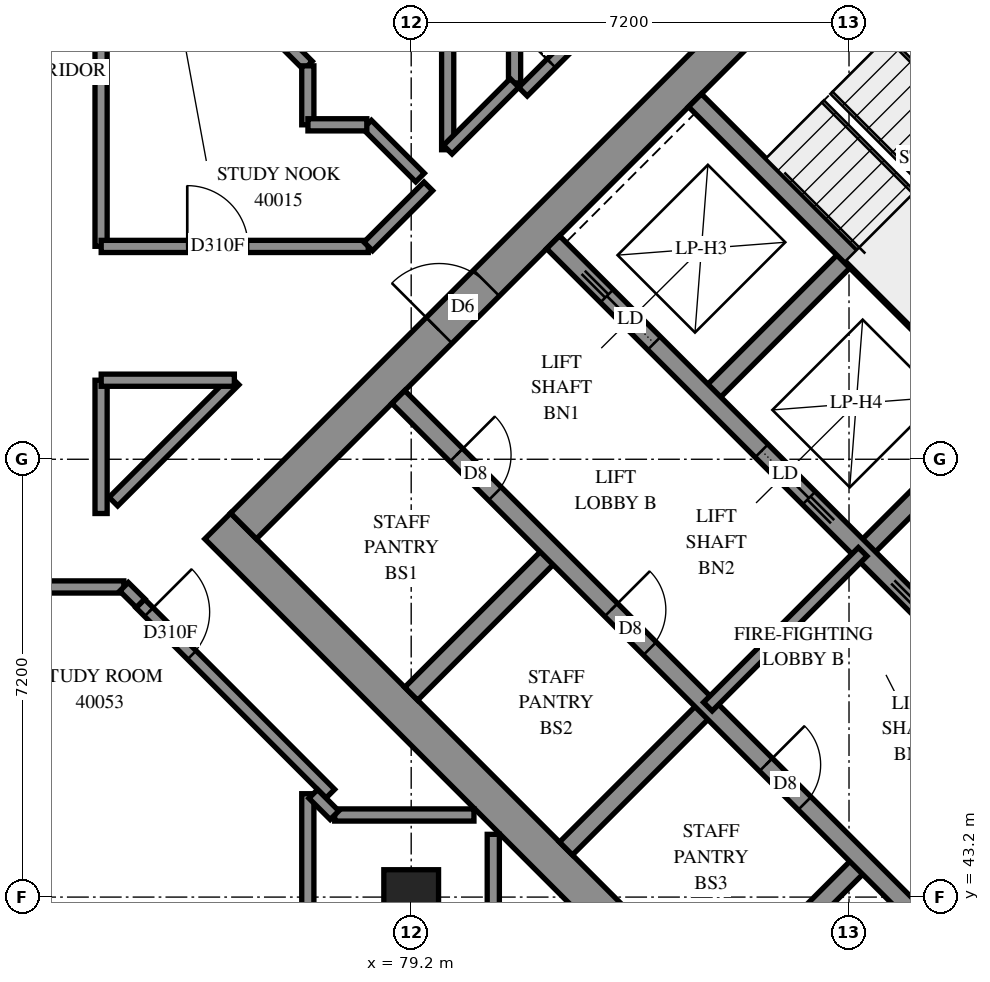
"""IFC4 building model, lengths in metres.
Left out: names, types, materials, properties, quantities, classifications, styles, units other than length and angle.
Written with IfcOpenShell. Run it as: python <this file> out.ifc"""

import sys

from ifc_helpers import new_model, si_unit, direction, frame, frame_2d, origin, origin_2d, place, context, subcontext, project, spatial, rectangle, extrude, element, fill, save


model = new_model("IFC4")
c1 = context("Model", 3, precision=1e-05, world=origin(), true_north=direction((0.0, 1.0)))
c2 = subcontext(c1, "Body", "Model", "MODEL_VIEW")
j1 = project(units=[si_unit("LENGTHUNIT", "METRE"), si_unit("PLANEANGLEUNIT", "RADIAN")], contexts=[c1])
p1 = place(None, origin())
s1 = spatial("IfcSite", under=j1, at=p1, CompositionType="ELEMENT")
p2 = place(p1, origin())
s2 = spatial("IfcBuilding", under=s1, at=p2, CompositionType="ELEMENT")
p3 = place(p2, frame((0.0, 0.0, 149.0)))
s3 = spatial("IfcBuildingStorey", under=s2, at=p3, CompositionType="ELEMENT", Elevation=149.0)
p4 = place(p3, frame((79.2, 43.2, 0.0), z_axis=(0.0, 0.0, 1.0), x_axis=(1.0, 0.0, 0.0)))
e1 = element("IfcColumn", 1, at=p4, inside=s3, PredefinedType="COLUMN", context=c2, shape_type="SweptSolid", body=[
    extrude(rectangle(XDim=0.9, YDim=0.9, at=origin_2d()), origin(), (0.0, 0.0, 1.0), 3.1),
])
p5 = place(p3, frame((76.018, 49.302, -0.3), z_axis=(0.0, 0.0, 1.0), x_axis=(0.7071067812, -0.7071067812, 0.0)))
e2 = element("IfcWall", 2, at=p5, inside=s3, PredefinedType="SHEAR", context=c2, shape_type="SweptSolid", body=[
    extrude(rectangle(XDim=15.6, YDim=0.6, at=frame_2d((7.8, 0.0))), origin(), (0.0, 0.0, 1.0), 2.7),
])
p6 = place(p3, frame((86.625, 59.908, -0.3), z_axis=(0.0, 0.0, 1.0), x_axis=(0.7071067812, -0.7071067812, 0.0)))
e3 = element("IfcWall", 3, at=p6, inside=s3, PredefinedType="SHEAR", context=c2, shape_type="SweptSolid", body=[
    extrude(rectangle(XDim=15.6, YDim=0.6, at=frame_2d((7.8, 0.0))), origin(), (0.0, 0.0, 1.0), 2.7),
])
p7 = place(p6, frame((10.6, 0.0, 0.3)))
e4 = element("IfcOpeningElement", 4, at=p7, cuts=e3, PredefinedType="OPENING", context=c2, shape_type="SweptSolid", body=[
    extrude(rectangle(XDim=0.8, YDim=2.1, at=frame_2d((0.4, 1.05))), frame((0.0, 0.31, 0.0), z_axis=(0.0, -1.0, 0.0), x_axis=(1.0, 0.0, 0.0)), (0.0, 0.0, 1.0), 0.62),
])
p8 = place(p3, frame((76.442, 49.302, -0.3), z_axis=(0.0, 0.0, 1.0), x_axis=(0.7071067812, 0.7071067812, 0.0)))
e5 = element("IfcWall", 5, at=p8, inside=s3, PredefinedType="SHEAR", context=c2, shape_type="SweptSolid", body=[
    extrude(rectangle(XDim=14.4, YDim=0.6, at=frame_2d((7.2, 0.0))), origin(), (0.0, 0.0, 1.0), 2.7),
])
p9 = place(p8, frame((4.55, 0.0, 0.3)))
e6 = element("IfcOpeningElement", 6, at=p9, cuts=e5, PredefinedType="OPENING", context=c2, shape_type="SweptSolid", body=[
    extrude(rectangle(XDim=1.1, YDim=2.1, at=frame_2d((0.55, 1.05))), frame((0.0, 0.31, 0.0), z_axis=(0.0, -1.0, 0.0), x_axis=(1.0, 0.0, 0.0)), (0.0, 0.0, 1.0), 0.62),
])
p10 = place(p8, frame((11.35, 0.0, 0.3)))
e7 = element("IfcOpeningElement", 7, at=p10, cuts=e5, PredefinedType="OPENING", context=c2, shape_type="SweptSolid", body=[
    extrude(rectangle(XDim=1.1, YDim=2.1, at=frame_2d((0.55, 1.05))), frame((0.0, 0.31, 0.0), z_axis=(0.0, -1.0, 0.0), x_axis=(1.0, 0.0, 0.0)), (0.0, 0.0, 1.0), 0.62),
])
p11 = place(p3, frame((87.049, 38.695, -0.3), z_axis=(0.0, 0.0, 1.0), x_axis=(0.7071067812, 0.7071067812, 0.0)))
e8 = element("IfcWall", 8, at=p11, inside=s3, PredefinedType="SHEAR", context=c2, shape_type="SweptSolid", body=[
    extrude(rectangle(XDim=14.4, YDim=0.6, at=frame_2d((7.2, 0.0))), origin(), (0.0, 0.0, 1.0), 2.7),
])
p12 = place(p11, frame((4.55, 0.0, 0.3)))
e9 = element("IfcOpeningElement", 9, at=p12, cuts=e8, PredefinedType="OPENING", context=c2, shape_type="SweptSolid", body=[
    extrude(rectangle(XDim=1.1, YDim=2.1, at=frame_2d((0.55, 1.05))), frame((0.0, 0.31, 0.0), z_axis=(0.0, -1.0, 0.0), x_axis=(1.0, 0.0, 0.0)), (0.0, 0.0, 1.0), 0.62),
])
p13 = place(p11, frame((11.35, 0.0, 0.3)))
e10 = element("IfcOpeningElement", 10, at=p13, cuts=e8, PredefinedType="OPENING", context=c2, shape_type="SweptSolid", body=[
    extrude(rectangle(XDim=1.1, YDim=2.1, at=frame_2d((0.55, 1.05))), frame((0.0, 0.31, 0.0), z_axis=(0.0, -1.0, 0.0), x_axis=(1.0, 0.0, 0.0)), (0.0, 0.0, 1.0), 0.62),
])
for number, where, z_axis, x_axis in (
    (11, (79.2, 46.544, 0.0), (0.0, 0.0, 1.0), (0.707, 0.707, 0.0)),
    (12, (84.079, 51.423, 0.0), (0.0, 0.0, 1.0), (0.707, 0.707, 0.0)),
):
    element("IfcWall", number, at=place(p3, frame(where, z_axis=z_axis, x_axis=x_axis)), inside=s3, PredefinedType="SOLIDWALL", context=c2, shape_type="SweptSolid", body=[
        extrude(rectangle(XDim=3.3, YDim=0.3, at=frame_2d((1.65, 0.0))), origin(), (0.0, 0.0, 1.0), 3.1),
    ])
p14 = place(p3, frame((81.746, 43.999, 0.0), z_axis=(0.0, 0.0, 1.0), x_axis=(0.7071067812, 0.7071067812, 0.0)))
e13 = element("IfcWall", 13, at=p14, inside=s3, PredefinedType="SOLIDWALL", context=c2, shape_type="SweptSolid", body=[
    extrude(rectangle(XDim=3.3, YDim=0.3, at=frame_2d((1.65, 0.0))), origin(), (0.0, 0.0, 1.0), 3.1),
])
p15 = place(p3, frame((86.625, 48.878, 0.0), z_axis=(0.0, 0.0, 1.0), x_axis=(0.7071067812, 0.7071067812, 0.0)))
e14 = element("IfcWall", 14, at=p15, inside=s3, PredefinedType="SOLIDWALL", context=c2, shape_type="SweptSolid", body=[
    extrude(rectangle(XDim=3.3, YDim=0.3, at=frame_2d((1.65, 0.0))), origin(), (0.0, 0.0, 1.0), 3.1),
])
p16 = place(p3, frame((84.291, 41.453, 0.0), z_axis=(0.0, 0.0, 1.0), x_axis=(0.7071067812, 0.7071067812, 0.0)))
e15 = element("IfcWall", 15, at=p16, inside=s3, PredefinedType="SOLIDWALL", context=c2, shape_type="SweptSolid", body=[
    extrude(rectangle(XDim=3.3, YDim=0.3, at=frame_2d((1.65, 0.0))), origin(), (0.0, 0.0, 1.0), 3.1),
])
p17 = place(p3, frame((78.988, 51.423, 0.0), z_axis=(0.0, 0.0, 1.0), x_axis=(0.7071067812, -0.7071067812, 0.0)))
e16 = element("IfcWall", 16, at=p17, inside=s3, PredefinedType="SOLIDWALL", context=c2, shape_type="SweptSolid", body=[
    extrude(rectangle(XDim=14.4, YDim=0.3, at=frame_2d((7.2, 0.0))), origin(), (0.0, 0.0, 1.0), 3.1),
])
p18 = place(p17, frame((1.35, 0.0, 0.0)))
e17 = element("IfcOpeningElement", 17, at=p18, cuts=e16, PredefinedType="OPENING", context=c2, shape_type="SweptSolid", body=[
    extrude(rectangle(XDim=0.9, YDim=2.1, at=frame_2d((0.45, 1.05))), frame((0.0, 0.16, 0.0), z_axis=(0.0, -1.0, 0.0), x_axis=(1.0, 0.0, 0.0)), (0.0, 0.0, 1.0), 0.32),
])
p19 = place(p17, frame((4.95, 0.0, 0.0)))
e18 = element("IfcOpeningElement", 18, at=p19, cuts=e16, PredefinedType="OPENING", context=c2, shape_type="SweptSolid", body=[
    extrude(rectangle(XDim=0.9, YDim=2.1, at=frame_2d((0.45, 1.05))), frame((0.0, 0.16, 0.0), z_axis=(0.0, -1.0, 0.0), x_axis=(1.0, 0.0, 0.0)), (0.0, 0.0, 1.0), 0.32),
])
p20 = place(p17, frame((8.55, 0.0, 0.0)))
e19 = element("IfcOpeningElement", 19, at=p20, cuts=e16, PredefinedType="OPENING", context=c2, shape_type="SweptSolid", body=[
    extrude(rectangle(XDim=0.9, YDim=2.1, at=frame_2d((0.45, 1.05))), frame((0.0, 0.16, 0.0), z_axis=(0.0, -1.0, 0.0), x_axis=(1.0, 0.0, 0.0)), (0.0, 0.0, 1.0), 0.32),
])
p21 = place(p17, frame((12.05, 0.0, 0.0)))
e20 = element("IfcOpeningElement", 20, at=p21, cuts=e16, PredefinedType="OPENING", context=c2, shape_type="SweptSolid", body=[
    extrude(rectangle(XDim=1.1, YDim=2.1, at=frame_2d((0.55, 1.05))), frame((0.0, 0.16, 0.0), z_axis=(0.0, -1.0, 0.0), x_axis=(1.0, 0.0, 0.0)), (0.0, 0.0, 1.0), 0.32),
])
p22 = place(p3, frame((81.534, 53.969, 0.0), z_axis=(0.0, 0.0, 1.0), x_axis=(0.707103309, -0.7071102534, 0.0)))
e21 = element("IfcWall", 21, at=p22, inside=s3, PredefinedType="SOLIDWALL", context=c2, shape_type="SweptSolid", body=[
    extrude(rectangle(XDim=14.4, YDim=0.3, at=frame_2d((7.2, 0.0))), origin(), (0.0, 0.0, 1.0), 3.1),
])
p23 = place(p22, frame((1.25, 0.0, 0.0)))
e22 = element("IfcOpeningElement", 22, at=p23, cuts=e21, PredefinedType="OPENING", context=c2, shape_type="SweptSolid", body=[
    extrude(rectangle(XDim=1.1, YDim=2.1, at=frame_2d((0.55, 1.05))), frame((0.0, 0.16, 0.0), z_axis=(0.0, -1.0, 0.0), x_axis=(1.0, 0.0, 0.0)), (0.0, 0.0, 1.0), 0.32),
])
p24 = place(p22, frame((4.85, 0.0, 0.0)))
e23 = element("IfcOpeningElement", 23, at=p24, cuts=e21, PredefinedType="OPENING", context=c2, shape_type="SweptSolid", body=[
    extrude(rectangle(XDim=1.1, YDim=2.1, at=frame_2d((0.55, 1.05))), frame((0.0, 0.16, 0.0), z_axis=(0.0, -1.0, 0.0), x_axis=(1.0, 0.0, 0.0)), (0.0, 0.0, 1.0), 0.32),
])
p25 = place(p22, frame((8.45, 0.0, 0.0)))
e24 = element("IfcOpeningElement", 24, at=p25, cuts=e21, PredefinedType="OPENING", context=c2, shape_type="SweptSolid", body=[
    extrude(rectangle(XDim=1.1, YDim=2.1, at=frame_2d((0.55, 1.05))), frame((0.0, 0.16, 0.0), z_axis=(0.0, -1.0, 0.0), x_axis=(1.0, 0.0, 0.0)), (0.0, 0.0, 1.0), 0.32),
])
p26 = place(p22, frame((12.05, 0.0, 0.0)))
e25 = element("IfcOpeningElement", 25, at=p26, cuts=e21, PredefinedType="OPENING", context=c2, shape_type="SweptSolid", body=[
    extrude(rectangle(XDim=1.1, YDim=2.1, at=frame_2d((0.55, 1.05))), frame((0.0, 0.16, 0.0), z_axis=(0.0, -1.0, 0.0), x_axis=(1.0, 0.0, 0.0)), (0.0, 0.0, 1.0), 0.32),
])
p27 = place(p3, frame((83.867, 56.302, 0.0), z_axis=(0.0, 0.0, 1.0), x_axis=(0.7071137256, -0.7070998367, 0.0)))
e26 = element("IfcWall", 26, at=p27, inside=s3, PredefinedType="SOLIDWALL", context=c2, shape_type="SweptSolid", body=[
    extrude(rectangle(XDim=7.2, YDim=0.3, at=frame_2d((3.6, 0.0))), origin(), (0.0, 0.0, 1.0), 3.1),
])
p28 = place(p3, frame((84.079, 46.332, 0.0), z_axis=(0.0, 0.0, 1.0), x_axis=(0.7071067812, 0.7071067812, 0.0)))
e27 = element("IfcWall", 27, at=p28, inside=s3, PredefinedType="PARTITIONING", context=c2, shape_type="SweptSolid", body=[
    extrude(rectangle(XDim=3.6, YDim=0.2, at=frame_2d((1.8, 0.0))), origin(), (0.0, 0.0, 1.0), 3.1),
])
p29 = place(p3, frame((55.5, 48.3, 0.0), z_axis=(0.0, 0.0, 1.0), x_axis=(1.0, 0.0, 0.0)))
e28 = element("IfcWall", 28, at=p29, inside=s3, PredefinedType="PARTITIONING", context=c2, shape_type="SweptSolid", body=[
    extrude(rectangle(XDim=18.974, YDim=0.2, at=frame_2d((9.487, 0.0))), origin(), (0.0, 0.0, 1.0), 3.1),
])
p30 = place(p29, frame((4.4, 0.0, 0.0)))
e29 = element("IfcOpeningElement", 29, at=p30, cuts=e28, PredefinedType="OPENING", context=c2, shape_type="SweptSolid", body=[
    extrude(rectangle(XDim=0.9, YDim=2.1, at=frame_2d((0.45, 1.05))), frame((0.0, 0.11, 0.0), z_axis=(0.0, -1.0, 0.0), x_axis=(1.0, 0.0, 0.0)), (0.0, 0.0, 1.0), 0.22),
])
p31 = place(p29, frame((6.1, 0.0, 0.0)))
e30 = element("IfcOpeningElement", 30, at=p31, cuts=e28, PredefinedType="OPENING", context=c2, shape_type="SweptSolid", body=[
    extrude(rectangle(XDim=0.9, YDim=2.1, at=frame_2d((0.45, 1.05))), frame((0.0, 0.11, 0.0), z_axis=(0.0, -1.0, 0.0), x_axis=(1.0, 0.0, 0.0)), (0.0, 0.0, 1.0), 0.22),
])
p32 = place(p29, frame((13.162, 0.0, 0.0)))
e31 = element("IfcOpeningElement", 31, at=p32, cuts=e28, PredefinedType="OPENING", context=c2, shape_type="SweptSolid", body=[
    extrude(rectangle(XDim=1.0, YDim=2.1, at=frame_2d((0.5, 1.05))), frame((0.0, 0.11, 0.0), z_axis=(0.0, -1.0, 0.0), x_axis=(1.0, 0.0, 0.0)), (0.0, 0.0, 1.0), 0.22),
])
p33 = place(p3, frame((81.038, 56.444, 0.0), z_axis=(0.0, 0.0, 1.0), x_axis=(0.7071067812, 0.7071067812, 0.0)))
e32 = element("IfcWall", 32, at=p33, inside=s3, PredefinedType="PARTITIONING", context=c2, shape_type="SweptSolid", body=[
    extrude(rectangle(XDim=8.2, YDim=0.2, at=frame_2d((4.1, 0.0))), origin(), (0.0, 0.0, 1.0), 3.1),
])
p34 = place(p33, frame((0.66, 0.0, 0.0)))
e33 = element("IfcOpeningElement", 33, at=p34, cuts=e32, PredefinedType="OPENING", context=c2, shape_type="SweptSolid", body=[
    extrude(rectangle(XDim=1.0, YDim=2.1, at=frame_2d((0.5, 1.05))), frame((0.0, 0.11, 0.0), z_axis=(0.0, -1.0, 0.0), x_axis=(1.0, 0.0, 0.0)), (0.0, 0.0, 1.0), 0.22),
])
p35 = place(p3, frame((74.1, 53.902, 0.0), z_axis=(0.0, 0.0, 1.0), x_axis=(0.0, 1.0, 0.0)))
e34 = element("IfcWall", 34, at=p35, inside=s3, PredefinedType="PARTITIONING", context=c2, shape_type="SweptSolid", body=[
    extrude(rectangle(XDim=6.366, YDim=0.2, at=frame_2d((3.183, 0.0))), origin(), (0.0, 0.0, 1.0), 3.1),
])
p36 = place(p3, frame((74.745, 48.029, 0.0), z_axis=(0.0, 0.0, 1.0), x_axis=(0.7068806156, -0.7073328745, 0.0)))
e35 = element("IfcWall", 35, at=p36, inside=s3, PredefinedType="PARTITIONING", context=c2, shape_type="SweptSolid", body=[
    extrude(rectangle(XDim=4.422, YDim=0.2, at=frame_2d((2.211, 0.0))), origin(), (0.0, 0.0, 1.0), 3.1),
])
p37 = place(p36, frame((0.199, 0.0, 0.0)))
e36 = element("IfcOpeningElement", 36, at=p37, cuts=e35, PredefinedType="OPENING", context=c2, shape_type="SweptSolid", body=[
    extrude(rectangle(XDim=1.0, YDim=2.1, at=frame_2d((0.5, 1.05))), frame((0.0, 0.11, 0.0), z_axis=(0.0, -1.0, 0.0), x_axis=(1.0, 0.0, 0.0)), (0.0, 0.0, 1.0), 0.22),
])
p38 = place(p3, frame((74.102, 53.9, 0.0), z_axis=(0.0, 0.0, 1.0), x_axis=(1.0, 0.0, 0.0)))
e37 = element("IfcWall", 37, at=p38, inside=s3, PredefinedType="PARTITIONING", context=c2, shape_type="SweptSolid", body=[
    extrude(rectangle(XDim=4.392, YDim=0.2, at=frame_2d((2.196, 0.0))), origin(), (0.0, 0.0, 1.0), 3.1),
])
p39 = place(p38, frame((1.415, 0.0, 0.0)))
e38 = element("IfcOpeningElement", 38, at=p39, cuts=e37, PredefinedType="OPENING", context=c2, shape_type="SweptSolid", body=[
    extrude(rectangle(XDim=1.0, YDim=2.1, at=frame_2d((0.5, 1.05))), frame((0.0, 0.11, 0.0), z_axis=(0.0, -1.0, 0.0), x_axis=(1.0, 0.0, 0.0)), (0.0, 0.0, 1.0), 0.22),
])
p40 = place(p3, frame((77.5, 40.983, 0.0), z_axis=(0.0, 0.0, 1.0), x_axis=(0.0, 1.0, 0.0)))
e39 = element("IfcWall", 39, at=p40, inside=s3, PredefinedType="PARTITIONING", context=c2, shape_type="SweptSolid", body=[
    extrude(rectangle(XDim=3.917, YDim=0.2, at=frame_2d((1.958, 0.0))), origin(), (0.0, 0.0, 1.0), 3.1),
])
p41 = place(p3, frame((79.8, 55.49, 0.0), z_axis=(0.0, 0.0, 1.0), x_axis=(0.0, 1.0, 0.0)))
e40 = element("IfcWall", 40, at=p41, inside=s3, PredefinedType="PARTITIONING", context=c2, shape_type="SweptSolid", body=[
    extrude(rectangle(XDim=3.81, YDim=0.2, at=frame_2d((1.905, 0.0))), origin(), (0.0, 0.0, 1.0), 3.1),
])
p42 = place(p3, frame((74.302, 49.704, 0.0), z_axis=(0.0, 0.0, 1.0), x_axis=(0.7074614873, 0.706751897, 0.0)))
e41 = element("IfcWall", 41, at=p42, inside=s3, PredefinedType="PARTITIONING", context=c2, shape_type="SweptSolid", body=[
    extrude(rectangle(XDim=2.818, YDim=0.2, at=frame_2d((1.409, 0.0))), origin(), (0.0, 0.0, 1.0), 3.1),
])
p43 = place(p3, frame((75.879, 58.497, 0.0), z_axis=(0.0, 0.0, 1.0), x_axis=(0.7075423257, -0.7066709682, 0.0)))
e42 = element("IfcWall", 42, at=p43, inside=s3, PredefinedType="PARTITIONING", context=c2, shape_type="SweptSolid", body=[
    extrude(rectangle(XDim=2.295, YDim=0.2, at=frame_2d((1.148, 0.0))), origin(), (0.0, 0.0, 1.0), 3.1),
])
for number, where, z_axis, x_axis in (
    (43, (77.942, 44.55, 0.0), (0.0, 0.0, 1.0), (1.0, 0.0, 0.0)),
    (44, (80.55, 41.942, 0.0), (0.0, 0.0, 1.0), (0.0, 1.0, 0.0)),
):
    element("IfcWall", number, at=place(p3, frame(where, z_axis=z_axis, x_axis=x_axis)), inside=s3, PredefinedType="PARTITIONING", context=c2, shape_type="SweptSolid", body=[
        extrude(rectangle(XDim=2.29, YDim=0.2, at=frame_2d((1.145, 0.0))), origin(), (0.0, 0.0, 1.0), 3.1),
    ])
p44 = place(p3, frame((74.1, 49.508, 0.0), z_axis=(0.0, 0.0, 1.0), x_axis=(0.0, 1.0, 0.0)))
e45 = element("IfcWall", 45, at=p44, inside=s3, PredefinedType="PARTITIONING", context=c2, shape_type="SweptSolid", body=[
    extrude(rectangle(XDim=2.192, YDim=0.2, at=frame_2d((1.096, 0.0))), origin(), (0.0, 0.0, 1.0), 3.1),
])
p45 = place(p3, frame((74.102, 51.7, 0.0), z_axis=(0.0, 0.0, 1.0), x_axis=(1.0, 0.0, 0.0)))
e46 = element("IfcWall", 46, at=p45, inside=s3, PredefinedType="PARTITIONING", context=c2, shape_type="SweptSolid", body=[
    extrude(rectangle(XDim=2.19, YDim=0.2, at=frame_2d((1.095, 0.0))), origin(), (0.0, 0.0, 1.0), 3.1),
])
p46 = place(p3, frame((80.9, 56.588, 0.0), z_axis=(0.0, 0.0, 1.0), x_axis=(0.0, 1.0, 0.0)))
e47 = element("IfcWall", 47, at=p46, inside=s3, PredefinedType="PARTITIONING", context=c2, shape_type="SweptSolid", body=[
    extrude(rectangle(XDim=1.838, YDim=0.2, at=frame_2d((0.919, 0.0))), origin(), (0.0, 0.0, 1.0), 3.1),
])
p47 = place(p3, frame((79.801, 55.491, 0.0), z_axis=(0.0, 0.0, 1.0), x_axis=(0.7071067812, 0.7071067812, 0.0)))
e48 = element("IfcWall", 48, at=p47, inside=s3, PredefinedType="PARTITIONING", context=c2, shape_type="SweptSolid", body=[
    extrude(rectangle(XDim=1.553, YDim=0.2, at=frame_2d((0.776, 0.0))), origin(), (0.0, 0.0, 1.0), 3.1),
])
p48 = place(p3, frame((78.494, 53.9, 0.0), z_axis=(0.0, 0.0, 1.0), x_axis=(0.7071067812, 0.7071067812, 0.0)))
e49 = element("IfcWall", 49, at=p48, inside=s3, PredefinedType="PARTITIONING", context=c2, shape_type="SweptSolid", body=[
    extrude(rectangle(XDim=1.397, YDim=0.2, at=frame_2d((0.699, 0.0))), origin(), (0.0, 0.0, 1.0), 3.1),
])
p49 = place(p3, frame((78.475, 55.903, 0.0), z_axis=(0.0, 0.0, 1.0), x_axis=(0.7071067812, -0.7071067812, 0.0)))
e50 = element("IfcWall", 50, at=p49, inside=s3, PredefinedType="PARTITIONING", context=c2, shape_type="SweptSolid", body=[
    extrude(rectangle(XDim=1.23, YDim=0.2, at=frame_2d((0.615, 0.0))), origin(), (0.0, 0.0, 1.0), 3.1),
])
p50 = place(p3, frame((77.5, 55.9, 0.0), z_axis=(0.0, 0.0, 1.0), x_axis=(0.0, 1.0, 0.0)))
e51 = element("IfcWall", 51, at=p50, inside=s3, PredefinedType="PARTITIONING", context=c2, shape_type="SweptSolid", body=[
    extrude(rectangle(XDim=0.97, YDim=0.2, at=frame_2d((0.485, 0.0))), origin(), (0.0, 0.0, 1.0), 3.1),
])
p51 = place(p3, frame((77.502, 55.9, 0.0), z_axis=(0.0, 0.0, 1.0), x_axis=(1.0, 0.0, 0.0)))
e52 = element("IfcWall", 52, at=p51, inside=s3, PredefinedType="PARTITIONING", context=c2, shape_type="SweptSolid", body=[
    extrude(rectangle(XDim=0.968, YDim=0.2, at=frame_2d((0.484, 0.0))), origin(), (0.0, 0.0, 1.0), 3.1),
])
p52 = place(p3, frame((77.588, 44.897, 0.0), z_axis=(0.0, 0.0, 1.0), x_axis=(0.7071067812, -0.7071067812, 0.0)))
e53 = element("IfcWall", 53, at=p52, inside=s3, PredefinedType="PARTITIONING", context=c2, shape_type="SweptSolid", body=[
    extrude(rectangle(XDim=0.495, YDim=0.2, at=frame_2d((0.247, 0.0))), origin(), (0.0, 0.0, 1.0), 3.1),
])
p53 = place(p3, frame((74.477, 48.303, 0.0), z_axis=(0.0, 0.0, 1.0), x_axis=(0.7097111995, -0.7044927348, 0.0)))
e54 = element("IfcWall", 54, at=p53, inside=s3, PredefinedType="PARTITIONING", context=c2, shape_type="SweptSolid", body=[
    extrude(rectangle(XDim=0.383, YDim=0.2, at=frame_2d((0.192, 0.0))), origin(), (0.0, 0.0, 1.0), 3.1),
])
p54 = place(p9, origin())
e55 = element("IfcDoor", 55, at=p54, inside=s3, OperationType="DOUBLE_DOOR_SINGLE_SWING", PredefinedType="DOOR", context=c2, shape_type="SweptSolid", body=[
    extrude(rectangle(XDim=1.1, YDim=2.1, at=frame_2d((0.55, 1.05))), frame((0.0, 0.025, 0.0), z_axis=(0.0, -1.0, 0.0), x_axis=(1.0, 0.0, 0.0)), (0.0, 0.0, 1.0), 0.05),
])
fill(e6, e55)
p55 = place(p18, origin())
e56 = element("IfcDoor", 56, at=p55, inside=s3, OperationType="SINGLE_SWING_LEFT", PredefinedType="DOOR", context=c2, shape_type="SweptSolid", body=[
    extrude(rectangle(XDim=0.9, YDim=2.1, at=frame_2d((0.45, 1.05))), frame((0.0, 0.025, 0.0), z_axis=(0.0, -1.0, 0.0), x_axis=(1.0, 0.0, 0.0)), (0.0, 0.0, 1.0), 0.05),
])
fill(e17, e56)
p56 = place(p19, origin())
e57 = element("IfcDoor", 57, at=p56, inside=s3, OperationType="SINGLE_SWING_LEFT", PredefinedType="DOOR", context=c2, shape_type="SweptSolid", body=[
    extrude(rectangle(XDim=0.9, YDim=2.1, at=frame_2d((0.45, 1.05))), frame((0.0, 0.025, 0.0), z_axis=(0.0, -1.0, 0.0), x_axis=(1.0, 0.0, 0.0)), (0.0, 0.0, 1.0), 0.05),
])
fill(e18, e57)
p57 = place(p20, origin())
e58 = element("IfcDoor", 58, at=p57, inside=s3, OperationType="SINGLE_SWING_LEFT", PredefinedType="DOOR", context=c2, shape_type="SweptSolid", body=[
    extrude(rectangle(XDim=0.9, YDim=2.1, at=frame_2d((0.45, 1.05))), frame((0.0, 0.025, 0.0), z_axis=(0.0, -1.0, 0.0), x_axis=(1.0, 0.0, 0.0)), (0.0, 0.0, 1.0), 0.05),
])
fill(e19, e58)
p58 = place(p23, origin())
e59 = element("IfcDoor", 59, at=p58, inside=s3, OperationType="SLIDING_TO_LEFT", PredefinedType="DOOR", context=c2, shape_type="SweptSolid", body=[
    extrude(rectangle(XDim=1.1, YDim=2.1, at=frame_2d((0.55, 1.05))), frame((0.0, 0.025, 0.0), z_axis=(0.0, -1.0, 0.0), x_axis=(1.0, 0.0, 0.0)), (0.0, 0.0, 1.0), 0.05),
])
fill(e22, e59)
p59 = place(p24, origin())
e60 = element("IfcDoor", 60, at=p59, inside=s3, OperationType="SLIDING_TO_RIGHT", PredefinedType="DOOR", context=c2, shape_type="SweptSolid", body=[
    extrude(rectangle(XDim=1.1, YDim=2.1, at=frame_2d((0.55, 1.05))), frame((0.0, 0.025, 0.0), z_axis=(0.0, -1.0, 0.0), x_axis=(1.0, 0.0, 0.0)), (0.0, 0.0, 1.0), 0.05),
])
fill(e23, e60)
p60 = place(p39, origin())
e61 = element("IfcDoor", 61, at=p60, inside=s3, OperationType="SINGLE_SWING_LEFT", PredefinedType="DOOR", context=c2, shape_type="SweptSolid", body=[
    extrude(rectangle(XDim=1.0, YDim=2.1, at=frame_2d((0.5, 1.05))), frame((0.0, 0.025, 0.0), z_axis=(0.0, -1.0, 0.0), x_axis=(1.0, 0.0, 0.0)), (0.0, 0.0, 1.0), 0.05),
])
fill(e38, e61)
p61 = place(p37, origin())
e62 = element("IfcDoor", 62, at=p61, inside=s3, OperationType="SINGLE_SWING_LEFT", PredefinedType="DOOR", context=c2, shape_type="SweptSolid", body=[
    extrude(rectangle(XDim=1.0, YDim=2.1, at=frame_2d((0.5, 1.05))), frame((0.0, 0.025, 0.0), z_axis=(0.0, -1.0, 0.0), x_axis=(1.0, 0.0, 0.0)), (0.0, 0.0, 1.0), 0.05),
])
fill(e36, e62)
p62 = place(p34, origin())
e63 = element("IfcDoor", 63, at=p62, inside=s3, OperationType="SINGLE_SWING_RIGHT", PredefinedType="DOOR", context=c2, shape_type="SweptSolid", body=[
    extrude(rectangle(XDim=1.0, YDim=2.1, at=frame_2d((0.5, 1.05))), frame((0.0, 0.025, 0.0), z_axis=(0.0, -1.0, 0.0), x_axis=(1.0, 0.0, 0.0)), (0.0, 0.0, 1.0), 0.05),
])
fill(e33, e63)
save(model, sys.argv[1])
